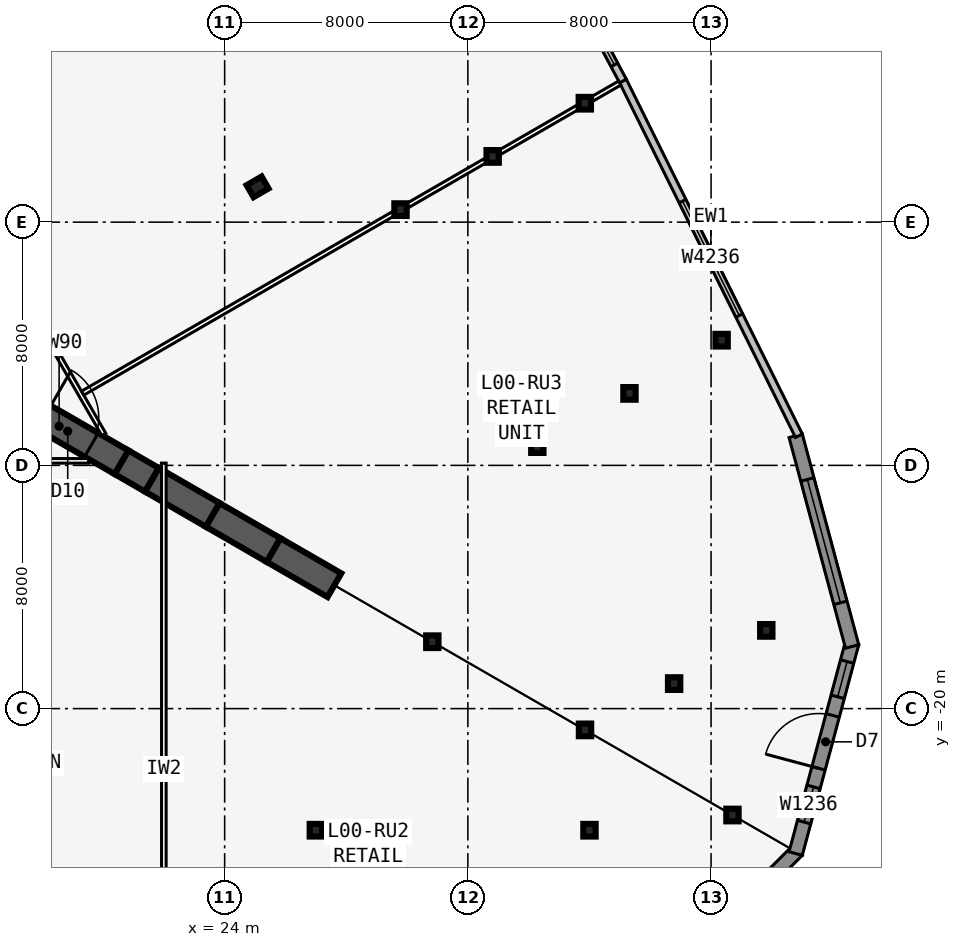
"""IFC4 building model, lengths in metres.
Left out: names, types, materials, properties, quantities, classifications, styles, units other than length and angle.
Written with IfcOpenShell. Run it as: python <this file> out.ifc"""

import sys

from ifc_helpers import new_model, si_unit, direction, frame, frame_2d, origin, origin_2d, place, context, subcontext, project, spatial, rectangle, i_section, extrude, element, fill, save


model = new_model("IFC4")
c1 = context("Model", 3, precision=1e-05, world=origin(), true_north=direction((0.0, 1.0)))
c2 = subcontext(c1, "Body", "Model", "MODEL_VIEW")
j1 = project(units=[si_unit("LENGTHUNIT", "METRE"), si_unit("PLANEANGLEUNIT", "RADIAN")], contexts=[c1])
p1 = place(None, origin())
s1 = spatial("IfcSite", under=j1, at=p1, CompositionType="ELEMENT")
p2 = place(p1, origin())
s2 = spatial("IfcBuilding", under=s1, at=p2, CompositionType="ELEMENT")
p3 = place(p2, origin())
s3 = spatial("IfcBuildingStorey", under=s2, at=p3, CompositionType="ELEMENT", Elevation=0.0)
p4 = place(p3, frame((16.5, -9.526, -0.3), z_axis=(0.0, 0.0, 1.0), x_axis=(0.866031398331, -0.499989616998, 0.0)))
e1 = element("IfcWall", 1, at=p4, inside=s3, PredefinedType="SHEAR", context=c2, shape_type="SweptSolid", body=[
    extrude(rectangle(XDim=4.746, YDim=0.9, at=frame_2d((2.373, 0.0))), origin(), (0.0, 0.0, 1.0), 6.3),
])
p5 = place(p4, frame((1.8, 0.0, 0.3)))
e2 = element("IfcOpeningElement", 2, at=p5, cuts=e1, PredefinedType="OPENING", context=c2, shape_type="SweptSolid", body=[
    extrude(rectangle(XDim=1.8, YDim=2.13, at=frame_2d((0.9, 1.065))), frame((0.0, 0.46, 0.0), z_axis=(0.0, -1.0, 0.0), x_axis=(1.0, 0.0, 0.0)), (0.0, 0.0, 1.0), 0.92),
])
p6 = place(p3, frame((20.61, -11.899, -0.3), z_axis=(0.0, 0.0, 1.0), x_axis=(0.866009537788, -0.500027479704, 0.0)))
e3 = element("IfcWall", 3, at=p6, inside=s3, PredefinedType="SHEAR", context=c2, shape_type="SweptSolid", body=[
    extrude(rectangle(XDim=1.155, YDim=0.9, at=frame_2d((0.577, 0.0))), origin(), (0.0, 0.0, 1.0), 6.3),
])
for number, where, z_axis, x_axis in (
    (4, (21.61, -12.477, -0.3), (0.0, 0.0, 1.0), (0.866, -0.5, 0.0)),
    (5, (23.61, -13.631, -0.3), (0.0, 0.0, 1.0), (0.866, -0.5, 0.0)),
    (6, (25.61, -14.786, -0.3), (0.0, 0.0, 1.0), (0.866, -0.5, 0.0)),
):
    element("IfcWall", number, at=place(p3, frame(where, z_axis=z_axis, x_axis=x_axis)), inside=s3, PredefinedType="SHEAR", context=c2, shape_type="SweptSolid", body=[
        extrude(rectangle(XDim=2.309, YDim=0.9, at=frame_2d((1.155, 0.0))), origin(), (0.0, 0.0, 1.0), 6.3),
    ])
p7 = place(p3, frame((25.083, -2.839, -0.3), z_axis=(0.0, 0.0, 1.0), x_axis=(-0.5, 0.866025403784, 0.0)))
e7 = element("IfcColumn", 7, at=p7, inside=s3, PredefinedType="COLUMN", context=c2, shape_type="SweptSolid", body=[
    extrude(i_section(OverallWidth=0.455, OverallDepth=0.569, WebThickness=0.078, FlangeThickness=0.125, at=origin_2d()), origin(), (0.0, 0.0, 1.0), 6.3),
])
for number, where, z_axis, x_axis in (
    (8, (30.831, -17.8, -0.3), (0.0, 0.0, 1.0), (1.0, 0.0, 0.0)),
    (9, (35.854, -20.7, -0.3), (0.0, 0.0, 1.0), (1.0, 0.0, 0.0)),
    (10, (40.703, -23.5, -0.3), (0.0, 0.0, 1.0), (1.0, 0.0, 0.0)),
    (11, (27.0, -24.0, -0.3), (0.0, 0.0, 1.0), (1.0, 0.0, 0.0)),
    (12, (36.0, -24.0, -0.3), (0.0, 0.0, 1.0), (1.0, 0.0, 0.0)),
    (13, (29.785, -3.588, -0.3), (0.0, 0.0, 1.0), (1.0, 0.0, 0.0)),
    (14, (34.285, -11.383, -0.3), (0.0, 0.0, 1.0), (1.0, 0.0, 0.0)),
    (15, (38.785, -19.177, -0.3), (0.0, 0.0, 1.0), (1.0, 0.0, 0.0)),
    (16, (32.816, -1.838, -0.3), (0.0, 0.0, 1.0), (1.0, 0.0, 0.0)),
    (17, (37.316, -9.633, -0.3), (0.0, 0.0, 1.0), (1.0, 0.0, 0.0)),
    (18, (41.816, -17.427, -0.3), (0.0, 0.0, 1.0), (1.0, 0.0, 0.0)),
    (19, (35.847, -0.088, -0.3), (0.0, 0.0, 1.0), (1.0, 0.0, 0.0)),
    (20, (40.347, -7.883, -0.3), (0.0, 0.0, 1.0), (1.0, 0.0, 0.0)),
):
    element("IfcColumn", number, at=place(p3, frame(where, z_axis=z_axis, x_axis=x_axis)), inside=s3, PredefinedType="COLUMN", context=c2, shape_type="SweptSolid", body=[
        extrude(i_section(OverallWidth=0.406, OverallDepth=0.417, WebThickness=0.03, FlangeThickness=0.048, at=origin_2d()), origin(), (0.0, 0.0, 1.0), 6.3),
    ])
p8 = place(p3, frame((37.769, -29.739, -0.3), z_axis=(0.0, 0.0, 1.0), x_axis=(0.707106781187, 0.707106781187, 0.0)))
e21 = element("IfcWall", 21, at=p8, inside=s3, PredefinedType="SOLIDWALL", context=c2, shape_type="SweptSolid", body=[
    extrude(rectangle(XDim=7.173, YDim=0.45, at=frame_2d((3.586, 0.0))), origin(), (0.0, 0.0, 1.0), 6.05),
])
p9 = place(p8, frame((1.268, 0.0, 1.2)))
e22 = element("IfcOpeningElement", 22, at=p9, cuts=e21, PredefinedType="OPENING", context=c2, shape_type="SweptSolid", body=[
    extrude(rectangle(XDim=4.2, YDim=3.6, at=frame_2d((2.1, 1.8))), frame((0.0, 0.235, 0.0), z_axis=(0.0, -1.0, 0.0), x_axis=(1.0, 0.0, 0.0)), (0.0, 0.0, 1.0), 0.47),
])
p10 = place(p3, frame((42.783, -24.768, -0.3), z_axis=(0.0, 0.0, 1.0), x_axis=(0.258823421857, 0.965924653531, 0.0)))
e23 = element("IfcWall", 23, at=p10, inside=s3, PredefinedType="SOLIDWALL", context=c2, shape_type="SweptSolid", body=[
    extrude(rectangle(XDim=7.173, YDim=0.45, at=frame_2d((3.586, 0.0))), origin(), (0.0, 0.0, 1.0), 6.05),
])
p11 = place(p10, frame((2.905, 0.0, 0.3)))
e24 = element("IfcOpeningElement", 24, at=p11, cuts=e23, PredefinedType="OPENING", context=c2, shape_type="SweptSolid", body=[
    extrude(rectangle(XDim=1.8, YDim=2.7, at=frame_2d((0.9, 1.35))), frame((0.0, 0.235, 0.0), z_axis=(0.0, -1.0, 0.0), x_axis=(1.0, 0.0, 0.0)), (0.0, 0.0, 1.0), 0.47),
])
p12 = place(p10, frame((1.071, 0.0, 1.2)))
e25 = element("IfcOpeningElement", 25, at=p12, cuts=e23, PredefinedType="OPENING", context=c2, shape_type="SweptSolid", body=[
    extrude(rectangle(XDim=1.2, YDim=3.6, at=frame_2d((0.6, 1.8))), frame((0.0, 0.235, 0.0), z_axis=(0.0, -1.0, 0.0), x_axis=(1.0, 0.0, 0.0)), (0.0, 0.0, 1.0), 0.47),
])
p13 = place(p10, frame((5.339, 0.0, 1.2)))
e26 = element("IfcOpeningElement", 26, at=p13, cuts=e23, PredefinedType="OPENING", context=c2, shape_type="SweptSolid", body=[
    extrude(rectangle(XDim=1.2, YDim=3.6, at=frame_2d((0.6, 1.8))), frame((0.0, 0.235, 0.0), z_axis=(0.0, -1.0, 0.0), x_axis=(1.0, 0.0, 0.0)), (0.0, 0.0, 1.0), 0.47),
])
p14 = place(p3, frame((44.639, -17.956, -0.3), z_axis=(0.0, 0.0, 1.0), x_axis=(-0.258823421857, 0.965924653531, 0.0)))
e27 = element("IfcWall", 27, at=p14, inside=s3, PredefinedType="SOLIDWALL", context=c2, shape_type="SweptSolid", body=[
    extrude(rectangle(XDim=7.173, YDim=0.45, at=frame_2d((3.586, 0.0))), origin(), (0.0, 0.0, 1.0), 6.05),
])
p15 = place(p14, frame((1.486, 0.0, 1.2)))
e28 = element("IfcOpeningElement", 28, at=p15, cuts=e27, PredefinedType="OPENING", context=c2, shape_type="SweptSolid", body=[
    extrude(rectangle(XDim=4.2, YDim=3.6, at=frame_2d((2.1, 1.8))), frame((0.0, 0.235, 0.0), z_axis=(0.0, -1.0, 0.0), x_axis=(1.0, 0.0, 0.0)), (0.0, 0.0, 1.0), 0.47),
])
p16 = place(p3, frame((42.888, -11.025, -0.3), z_axis=(0.0, 0.0, 1.0), x_axis=(-0.444354908353, 0.895850833243, 0.0)))
e29 = element("IfcWall", 29, at=p16, inside=s3, PredefinedType="STANDARD", context=c2, shape_type="SweptSolid", body=[
    extrude(rectangle(XDim=13.026, YDim=0.25, at=frame_2d((6.513, 0.0))), origin(), (0.0, 0.0, 1.0), 6.05),
])
p17 = place(p16, frame((4.413, 0.0, 1.2)))
e30 = element("IfcOpeningElement", 30, at=p17, cuts=e29, PredefinedType="OPENING", context=c2, shape_type="SweptSolid", body=[
    extrude(rectangle(XDim=4.2, YDim=3.6, at=frame_2d((2.1, 1.8))), frame((0.0, 0.135, 0.0), z_axis=(0.0, -1.0, 0.0), x_axis=(1.0, 0.0, 0.0)), (0.0, 0.0, 1.0), 0.27),
])
p18 = place(p3, frame((37.101, 0.641, -0.3), z_axis=(0.0, 0.0, 1.0), x_axis=(-0.469531141255, 0.882915911846, 0.0)))
e31 = element("IfcWall", 31, at=p18, inside=s3, PredefinedType="STANDARD", context=c2, shape_type="SweptSolid", body=[
    extrude(rectangle(XDim=9.005, YDim=0.25, at=frame_2d((4.503, 0.0))), origin(), (0.0, 0.0, 1.0), 6.05),
])
p19 = place(p18, frame((3.603, 0.0, 0.3)))
e32 = element("IfcOpeningElement", 32, at=p19, cuts=e31, PredefinedType="OPENING", context=c2, shape_type="SweptSolid", body=[
    extrude(rectangle(XDim=1.8, YDim=2.7, at=frame_2d((0.9, 1.35))), frame((0.0, 0.135, 0.0), z_axis=(0.0, -1.0, 0.0), x_axis=(1.0, 0.0, 0.0)), (0.0, 0.0, 1.0), 0.27),
])
p20 = place(p18, frame((0.601, 0.0, 1.2)))
e33 = element("IfcOpeningElement", 33, at=p20, cuts=e31, PredefinedType="OPENING", context=c2, shape_type="SweptSolid", body=[
    extrude(rectangle(XDim=2.4, YDim=3.6, at=frame_2d((1.2, 1.8))), frame((0.0, 0.135, 0.0), z_axis=(0.0, -1.0, 0.0), x_axis=(1.0, 0.0, 0.0)), (0.0, 0.0, 1.0), 0.27),
])
p21 = place(p18, frame((6.004, 0.0, 1.2)))
e34 = element("IfcOpeningElement", 34, at=p21, cuts=e31, PredefinedType="OPENING", context=c2, shape_type="SweptSolid", body=[
    extrude(rectangle(XDim=2.4, YDim=3.6, at=frame_2d((1.2, 1.8))), frame((0.0, 0.135, 0.0), z_axis=(0.0, -1.0, 0.0), x_axis=(1.0, 0.0, 0.0)), (0.0, 0.0, 1.0), 0.27),
])
p22 = place(p3, frame((-19.527, -11.851, -0.3), z_axis=(0.0, 0.0, 1.0), x_axis=(1.0, 0.0, 0.0)))
e35 = element("IfcWall", 35, at=p22, inside=s3, PredefinedType="PARTITIONING", context=c2, shape_type="SweptSolid", body=[
    extrude(rectangle(XDim=39.054, YDim=0.15, at=frame_2d((19.527, 0.0))), origin(), (0.0, 0.0, 1.0), 5.108),
])
p23 = place(p22, frame((8.427, 0.0, 0.3)))
e36 = element("IfcOpeningElement", 36, at=p23, cuts=e35, PredefinedType="OPENING", context=c2, shape_type="SweptSolid", body=[
    extrude(rectangle(XDim=1.8, YDim=2.13, at=frame_2d((0.9, 1.065))), frame((0.0, 0.085, 0.0), z_axis=(0.0, -1.0, 0.0), x_axis=(1.0, 0.0, 0.0)), (0.0, 0.0, 1.0), 0.17),
])
p24 = place(p22, frame((18.427, 0.0, 0.3)))
e37 = element("IfcOpeningElement", 37, at=p24, cuts=e35, PredefinedType="OPENING", context=c2, shape_type="SweptSolid", body=[
    extrude(rectangle(XDim=1.8, YDim=2.13, at=frame_2d((0.9, 1.065))), frame((0.0, 0.085, 0.0), z_axis=(0.0, -1.0, 0.0), x_axis=(1.0, 0.0, 0.0)), (0.0, 0.0, 1.0), 0.17),
])
p25 = place(p22, frame((23.227, 0.0, 0.3)))
e38 = element("IfcOpeningElement", 38, at=p25, cuts=e35, PredefinedType="OPENING", context=c2, shape_type="SweptSolid", body=[
    extrude(rectangle(XDim=1.8, YDim=2.13, at=frame_2d((0.9, 1.065))), frame((0.0, 0.085, 0.0), z_axis=(0.0, -1.0, 0.0), x_axis=(1.0, 0.0, 0.0)), (0.0, 0.0, 1.0), 0.17),
])
p26 = place(p22, frame((28.127, 0.0, 0.3)))
e39 = element("IfcOpeningElement", 39, at=p26, cuts=e35, PredefinedType="OPENING", context=c2, shape_type="SweptSolid", body=[
    extrude(rectangle(XDim=1.0, YDim=2.13, at=frame_2d((0.5, 1.065))), frame((0.0, 0.085, 0.0), z_axis=(0.0, -1.0, 0.0), x_axis=(1.0, 0.0, 0.0)), (0.0, 0.0, 1.0), 0.17),
])
p27 = place(p22, frame((33.74, 0.0, 0.3)))
e40 = element("IfcOpeningElement", 40, at=p27, cuts=e35, PredefinedType="OPENING", context=c2, shape_type="SweptSolid", body=[
    extrude(rectangle(XDim=1.8, YDim=2.13, at=frame_2d((0.9, 1.065))), frame((0.0, 0.085, 0.0), z_axis=(0.0, -1.0, 0.0), x_axis=(1.0, 0.0, 0.0)), (0.0, 0.0, 1.0), 0.17),
])
p28 = place(p3, frame((22.0, -11.926, -0.3), z_axis=(0.0, 0.0, 1.0), x_axis=(0.0, -1.0, 0.0)))
e41 = element("IfcWall", 41, at=p28, inside=s3, PredefinedType="PARTITIONING", context=c2, shape_type="SweptSolid", body=[
    extrude(rectangle(XDim=20.146, YDim=0.15, at=frame_2d((10.073, 0.0))), origin(), (0.0, 0.0, 1.0), 6.05),
])
p29 = place(p3, frame((20.027, -10.985, -0.3), z_axis=(0.0, 0.0, 1.0), x_axis=(-0.500001677587, 0.866024435227, 0.0)))
e42 = element("IfcWall", 42, at=p29, inside=s3, PredefinedType="PARTITIONING", context=c2, shape_type="SweptSolid", body=[
    extrude(rectangle(XDim=39.054, YDim=0.15, at=frame_2d((19.527, 0.0))), origin(), (0.0, 0.0, 1.0), 5.108),
])
p30 = place(p29, frame((8.427, 0.0, 0.3)))
e43 = element("IfcOpeningElement", 43, at=p30, cuts=e42, PredefinedType="OPENING", context=c2, shape_type="SweptSolid", body=[
    extrude(rectangle(XDim=1.8, YDim=2.13, at=frame_2d((0.9, 1.065))), frame((0.0, 0.085, 0.0), z_axis=(0.0, -1.0, 0.0), x_axis=(1.0, 0.0, 0.0)), (0.0, 0.0, 1.0), 0.17),
])
p31 = place(p29, frame((18.427, 0.0, 0.3)))
e44 = element("IfcOpeningElement", 44, at=p31, cuts=e42, PredefinedType="OPENING", context=c2, shape_type="SweptSolid", body=[
    extrude(rectangle(XDim=1.8, YDim=2.13, at=frame_2d((0.9, 1.065))), frame((0.0, 0.085, 0.0), z_axis=(0.0, -1.0, 0.0), x_axis=(1.0, 0.0, 0.0)), (0.0, 0.0, 1.0), 0.17),
])
p32 = place(p29, frame((23.227, 0.0, 0.3)))
e45 = element("IfcOpeningElement", 45, at=p32, cuts=e42, PredefinedType="OPENING", context=c2, shape_type="SweptSolid", body=[
    extrude(rectangle(XDim=1.8, YDim=2.13, at=frame_2d((0.9, 1.065))), frame((0.0, 0.085, 0.0), z_axis=(0.0, -1.0, 0.0), x_axis=(1.0, 0.0, 0.0)), (0.0, 0.0, 1.0), 0.17),
])
p33 = place(p29, frame((27.627, 0.0, 0.3)))
e46 = element("IfcOpeningElement", 46, at=p33, cuts=e42, PredefinedType="OPENING", context=c2, shape_type="SweptSolid", body=[
    extrude(rectangle(XDim=1.0, YDim=2.13, at=frame_2d((0.5, 1.065))), frame((0.0, 0.085, 0.0), z_axis=(0.0, -1.0, 0.0), x_axis=(1.0, 0.0, 0.0)), (0.0, 0.0, 1.0), 0.17),
])
p34 = place(p29, frame((30.527, 0.0, 0.3)))
e47 = element("IfcOpeningElement", 47, at=p34, cuts=e42, PredefinedType="OPENING", context=c2, shape_type="SweptSolid", body=[
    extrude(rectangle(XDim=1.0, YDim=2.13, at=frame_2d((0.5, 1.065))), frame((0.0, 0.085, 0.0), z_axis=(0.0, -1.0, 0.0), x_axis=(1.0, 0.0, 0.0)), (0.0, 0.0, 1.0), 0.17),
])
p35 = place(p29, frame((33.277, 0.0, 0.3)))
e48 = element("IfcOpeningElement", 48, at=p35, cuts=e42, PredefinedType="OPENING", context=c2, shape_type="SweptSolid", body=[
    extrude(rectangle(XDim=1.0, YDim=2.13, at=frame_2d((0.5, 1.065))), frame((0.0, 0.085, 0.0), z_axis=(0.0, -1.0, 0.0), x_axis=(1.0, 0.0, 0.0)), (0.0, 0.0, 1.0), 0.17),
])
p36 = place(p29, frame((36.39, 0.0, 0.3)))
e49 = element("IfcOpeningElement", 49, at=p36, cuts=e42, PredefinedType="OPENING", context=c2, shape_type="SweptSolid", body=[
    extrude(rectangle(XDim=1.0, YDim=2.13, at=frame_2d((0.5, 1.065))), frame((0.0, 0.085, 0.0), z_axis=(0.0, -1.0, 0.0), x_axis=(1.0, 0.0, 0.0)), (0.0, 0.0, 1.0), 0.17),
])
p37 = place(p3, frame((19.329, -9.625, -0.3), z_axis=(0.0, 0.0, 1.0), x_axis=(0.866023552797, 0.500003205991, 0.0)))
e50 = element("IfcWall", 50, at=p37, inside=s3, PredefinedType="PARTITIONING", context=c2, shape_type="SweptSolid", body=[
    extrude(rectangle(XDim=20.399, YDim=0.15, at=frame_2d((10.2, 0.0))), origin(), (0.0, 0.0, 1.0), 6.05),
])
p38 = place(p11, origin())
e51 = element("IfcDoor", 51, at=p38, inside=s3, OperationType="DOUBLE_DOOR_SINGLE_SWING", PredefinedType="DOOR", context=c2, shape_type="SweptSolid", body=[
    extrude(rectangle(XDim=1.8, YDim=2.7, at=frame_2d((0.9, 1.35))), frame((0.0, 0.025, 0.0), z_axis=(0.0, -1.0, 0.0), x_axis=(1.0, 0.0, 0.0)), (0.0, 0.0, 1.0), 0.05),
])
fill(e24, e51)
p39 = place(p12, origin())
e52 = element("IfcWindow", 52, at=p39, inside=s3, PartitioningType="SINGLE_PANEL", PredefinedType="WINDOW", context=c2, shape_type="SweptSolid", body=[
    extrude(rectangle(XDim=1.2, YDim=3.6, at=frame_2d((0.6, 1.8))), frame((0.0, 0.03, 0.0), z_axis=(0.0, -1.0, 0.0), x_axis=(1.0, 0.0, 0.0)), (0.0, 0.0, 1.0), 0.06),
])
fill(e25, e52)
p40 = place(p13, origin())
e53 = element("IfcWindow", 53, at=p40, inside=s3, PartitioningType="SINGLE_PANEL", PredefinedType="WINDOW", context=c2, shape_type="SweptSolid", body=[
    extrude(rectangle(XDim=1.2, YDim=3.6, at=frame_2d((0.6, 1.8))), frame((0.0, 0.03, 0.0), z_axis=(0.0, -1.0, 0.0), x_axis=(1.0, 0.0, 0.0)), (0.0, 0.0, 1.0), 0.06),
])
fill(e26, e53)
p41 = place(p15, origin())
e54 = element("IfcWindow", 54, at=p41, inside=s3, PartitioningType="SINGLE_PANEL", PredefinedType="WINDOW", context=c2, shape_type="SweptSolid", body=[
    extrude(rectangle(XDim=4.2, YDim=3.6, at=frame_2d((2.1, 1.8))), frame((0.0, 0.03, 0.0), z_axis=(0.0, -1.0, 0.0), x_axis=(1.0, 0.0, 0.0)), (0.0, 0.0, 1.0), 0.06),
])
fill(e28, e54)
p42 = place(p17, origin())
e55 = element("IfcWindow", 55, at=p42, inside=s3, PartitioningType="SINGLE_PANEL", PredefinedType="WINDOW", context=c2, shape_type="SweptSolid", body=[
    extrude(rectangle(XDim=4.2, YDim=3.6, at=frame_2d((2.1, 1.8))), frame((0.0, 0.03, 0.0), z_axis=(0.0, -1.0, 0.0), x_axis=(1.0, 0.0, 0.0)), (0.0, 0.0, 1.0), 0.06),
])
fill(e30, e55)
p43 = place(p20, origin())
e56 = element("IfcWindow", 56, at=p43, inside=s3, PartitioningType="SINGLE_PANEL", PredefinedType="WINDOW", context=c2, shape_type="SweptSolid", body=[
    extrude(rectangle(XDim=2.4, YDim=3.6, at=frame_2d((1.2, 1.8))), frame((0.0, 0.03, 0.0), z_axis=(0.0, -1.0, 0.0), x_axis=(1.0, 0.0, 0.0)), (0.0, 0.0, 1.0), 0.06),
])
fill(e33, e56)
p44 = place(p5, origin())
e57 = element("IfcDoor", 57, at=p44, inside=s3, OperationType="DOUBLE_DOOR_DOUBLE_SWING", PredefinedType="DOOR", context=c2, shape_type="SweptSolid", body=[
    extrude(rectangle(XDim=1.8, YDim=2.13, at=frame_2d((0.9, 1.065))), frame((0.0, 0.025, 0.0), z_axis=(0.0, -1.0, 0.0), x_axis=(1.0, 0.0, 0.0)), (0.0, 0.0, 1.0), 0.05),
])
fill(e2, e57)
save(model, sys.argv[1])
